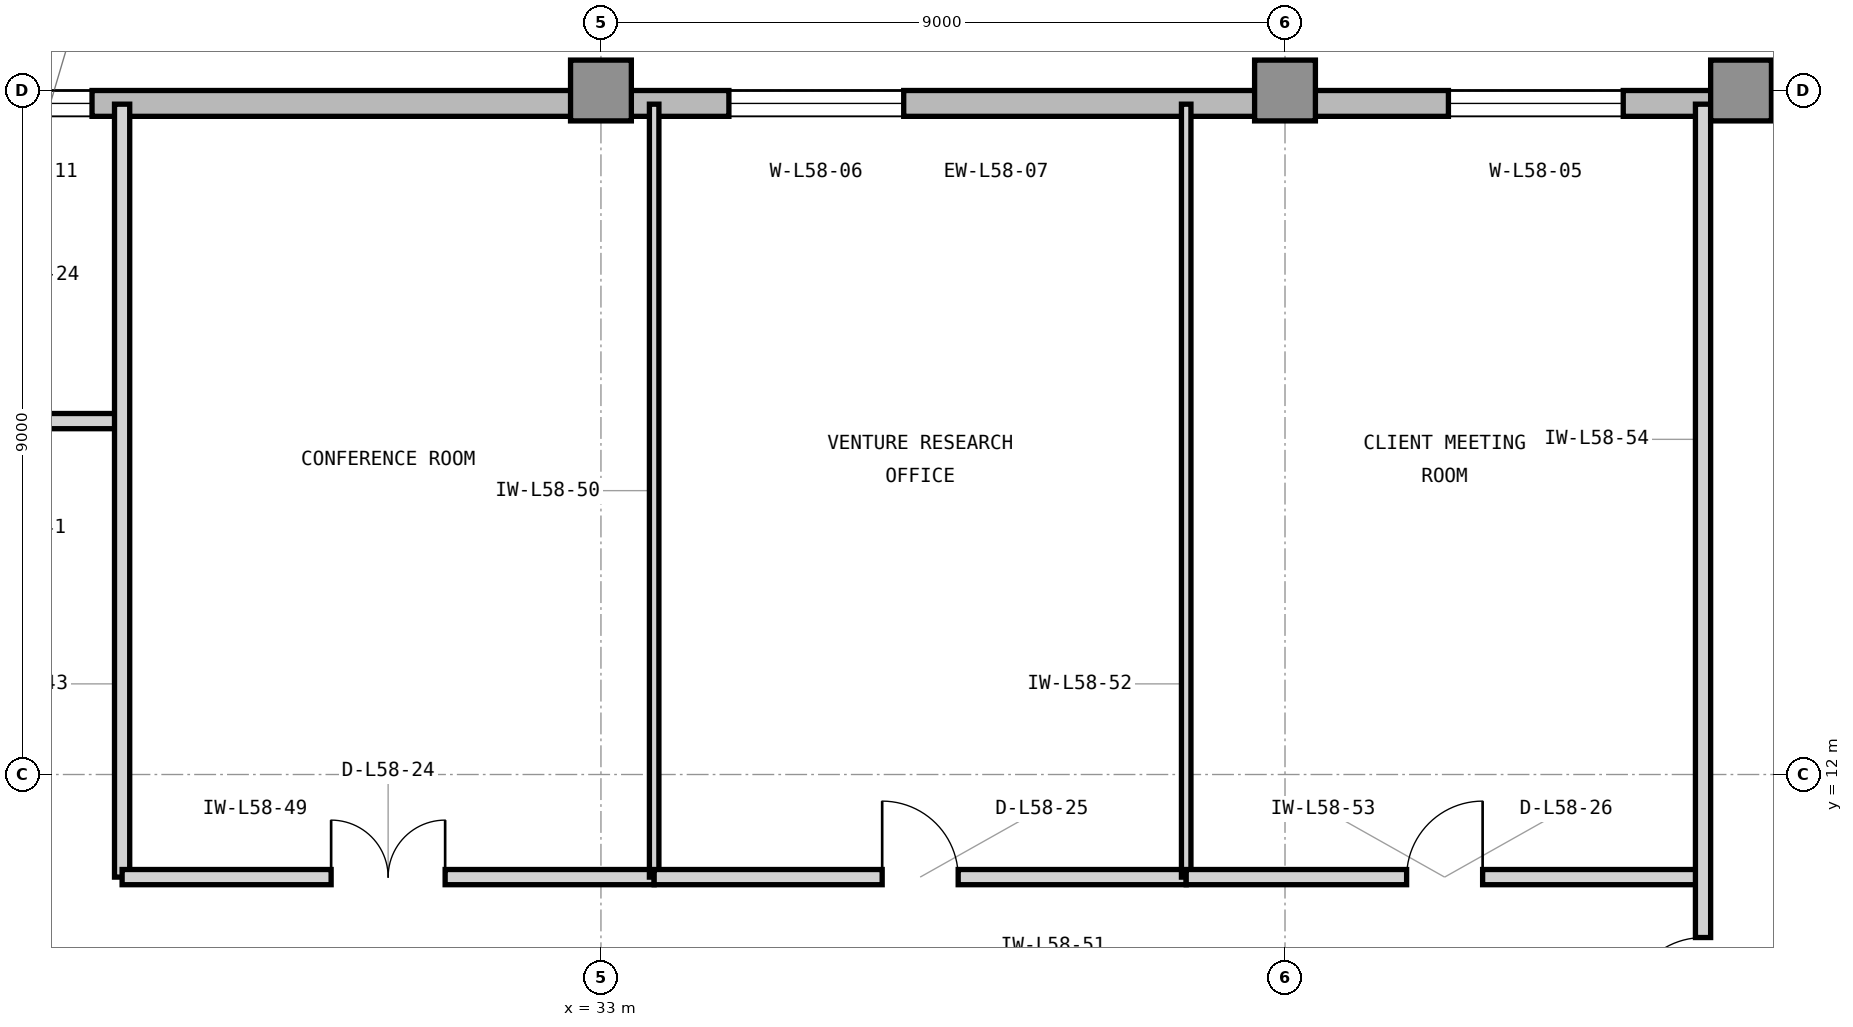
"""IFC4 building model, lengths in metres.
Left out: names, types, materials, properties, quantities, classifications, styles, units other than length and angle.
Written with IfcOpenShell. Run it as: python <this file> out.ifc"""

import sys

from ifc_helpers import new_model, si_unit, direction, frame, frame_2d, origin, origin_2d, place, context, subcontext, project, spatial, rectangle, extrude, element, fill, save


model = new_model("IFC4")
c1 = context("Model", 3, precision=1e-05, world=origin(), true_north=direction((0.0, 1.0)))
c2 = subcontext(c1, "Body", "Model", "MODEL_VIEW")
j1 = project(units=[si_unit("LENGTHUNIT", "METRE"), si_unit("PLANEANGLEUNIT", "RADIAN")], contexts=[c1])
p1 = place(None, origin())
s1 = spatial("IfcSite", under=j1, at=p1, CompositionType="ELEMENT")
p2 = place(p1, origin())
s2 = spatial("IfcBuilding", under=s1, at=p2, CompositionType="ELEMENT")
p3 = place(p2, frame((0.0, 0.0, 239.1)))
s3 = spatial("IfcBuildingStorey", under=s2, at=p3, CompositionType="ELEMENT", Elevation=239.1)
for number, where, z_axis, x_axis in (
    (1, (33.0, 21.0, 0.0), (0.0, 0.0, 1.0), (1.0, 0.0, 0.0)),
    (2, (42.0, 21.0, 0.0), (0.0, 0.0, 1.0), (1.0, 0.0, 0.0)),
    (3, (48.0, 21.0, 0.0), (0.0, 0.0, 1.0), (1.0, 0.0, 0.0)),
):
    element("IfcColumn", number, at=place(p3, frame(where, z_axis=z_axis, x_axis=x_axis)), inside=s3, PredefinedType="COLUMN", context=c2, shape_type="SweptSolid", body=[
        extrude(rectangle(XDim=0.8, YDim=0.8, at=origin_2d()), origin(), (0.0, 0.0, 1.0), 3.9),
    ])
p4 = place(p3, frame((52.4, 20.83, 0.0), z_axis=(0.0, 0.0, 1.0), x_axis=(-1.0, 0.0, 0.0)))
e4 = element("IfcWall", 4, at=p4, inside=s3, PredefinedType="STANDARD", context=c2, shape_type="SweptSolid", body=[
    extrude(rectangle(XDim=28.4, YDim=0.34, at=frame_2d((14.2, 0.0))), origin(), (0.0, 0.0, 1.0), 3.7),
])
p5 = place(p4, frame((5.95, 0.0, 0.9)))
e5 = element("IfcOpeningElement", 5, at=p5, cuts=e4, PredefinedType="OPENING", context=c2, shape_type="SweptSolid", body=[
    extrude(rectangle(XDim=2.3, YDim=2.2, at=frame_2d((1.15, 1.1))), frame((0.0, 0.18, 0.0), z_axis=(0.0, -1.0, 0.0), x_axis=(1.0, 0.0, 0.0)), (0.0, 0.0, 1.0), 0.36),
])
p6 = place(p4, frame((15.417, 0.0, 0.9)))
e6 = element("IfcOpeningElement", 6, at=p6, cuts=e4, PredefinedType="OPENING", context=c2, shape_type="SweptSolid", body=[
    extrude(rectangle(XDim=2.3, YDim=2.2, at=frame_2d((1.15, 1.1))), frame((0.0, 0.18, 0.0), z_axis=(0.0, -1.0, 0.0), x_axis=(1.0, 0.0, 0.0)), (0.0, 0.0, 1.0), 0.36),
])
p7 = place(p4, frame((26.096, 0.0, 0.9)))
e7 = element("IfcOpeningElement", 7, at=p7, cuts=e4, PredefinedType="OPENING", context=c2, shape_type="SweptSolid", body=[
    extrude(rectangle(XDim=1.6, YDim=2.2, at=frame_2d((0.8, 1.1))), frame((0.0, 0.18, 0.0), z_axis=(0.0, -1.0, 0.0), x_axis=(1.0, 0.0, 0.0)), (0.0, 0.0, 1.0), 0.36),
])
p8 = place(p3, frame((23.85, 16.65, 0.0), z_axis=(0.0, 0.0, 1.0), x_axis=(1.0, 0.0, 0.0)))
e8 = element("IfcWall", 8, at=p8, inside=s3, PredefinedType="PARTITIONING", context=c2, shape_type="SweptSolid", body=[
    extrude(rectangle(XDim=2.85, YDim=0.2, at=frame_2d((1.425, 0.0))), origin(), (0.0, 0.0, 1.0), 3.69),
])
p9 = place(p8, frame((0.7, 0.0, 0.0)))
e9 = element("IfcOpeningElement", 9, at=p9, cuts=e8, PredefinedType="OPENING", context=c2, shape_type="SweptSolid", body=[
    extrude(rectangle(XDim=1.0, YDim=2.15, at=frame_2d((0.5, 1.075))), frame((0.0, 0.11, 0.0), z_axis=(0.0, -1.0, 0.0), x_axis=(1.0, 0.0, 0.0)), (0.0, 0.0, 1.0), 0.22),
])
p10 = place(p3, frame((26.7, 10.65, 0.0), z_axis=(0.0, 0.0, 1.0), x_axis=(0.0, 1.0, 0.0)))
e10 = element("IfcWall", 10, at=p10, inside=s3, PredefinedType="PARTITIONING", context=c2, shape_type="SweptSolid", body=[
    extrude(rectangle(XDim=10.17, YDim=0.2, at=frame_2d((5.085, 0.0))), origin(), (0.0, 0.0, 1.0), 3.69),
])
p11 = place(p3, frame((26.7, 10.65, 0.0), z_axis=(0.0, 0.0, 1.0), x_axis=(1.0, 0.0, 0.0)))
e11 = element("IfcWall", 11, at=p11, inside=s3, PredefinedType="PARTITIONING", context=c2, shape_type="SweptSolid", body=[
    extrude(rectangle(XDim=7.0, YDim=0.2, at=frame_2d((3.5, 0.0))), origin(), (0.0, 0.0, 1.0), 3.69),
])
p12 = place(p11, frame((2.75, 0.0, 0.0)))
e12 = element("IfcOpeningElement", 12, at=p12, cuts=e11, PredefinedType="OPENING", context=c2, shape_type="SweptSolid", body=[
    extrude(rectangle(XDim=1.5, YDim=2.3, at=frame_2d((0.75, 1.15))), frame((0.0, 0.11, 0.0), z_axis=(0.0, -1.0, 0.0), x_axis=(1.0, 0.0, 0.0)), (0.0, 0.0, 1.0), 0.22),
])
p13 = place(p3, frame((33.7, 10.65, 0.0), z_axis=(0.0, 0.0, 1.0), x_axis=(0.0, 1.0, 0.0)))
e13 = element("IfcWall", 13, at=p13, inside=s3, PredefinedType="PARTITIONING", context=c2, shape_type="SweptSolid", body=[
    extrude(rectangle(XDim=10.17, YDim=0.125, at=frame_2d((5.085, 0.0))), origin(), (0.0, 0.0, 1.0), 3.69),
])
p14 = place(p3, frame((33.7, 10.65, 0.0), z_axis=(0.0, 0.0, 1.0), x_axis=(1.0, 0.0, 0.0)))
e14 = element("IfcWall", 14, at=p14, inside=s3, PredefinedType="PARTITIONING", context=c2, shape_type="SweptSolid", body=[
    extrude(rectangle(XDim=7.0, YDim=0.2, at=frame_2d((3.5, 0.0))), origin(), (0.0, 0.0, 1.0), 3.69),
])
p15 = place(p14, frame((3.0, 0.0, 0.0)))
e15 = element("IfcOpeningElement", 15, at=p15, cuts=e14, PredefinedType="OPENING", context=c2, shape_type="SweptSolid", body=[
    extrude(rectangle(XDim=1.0, YDim=2.15, at=frame_2d((0.5, 1.075))), frame((0.0, 0.11, 0.0), z_axis=(0.0, -1.0, 0.0), x_axis=(1.0, 0.0, 0.0)), (0.0, 0.0, 1.0), 0.22),
])
p16 = place(p3, frame((40.7, 10.65, 0.0), z_axis=(0.0, 0.0, 1.0), x_axis=(0.0, 1.0, 0.0)))
e16 = element("IfcWall", 16, at=p16, inside=s3, PredefinedType="PARTITIONING", context=c2, shape_type="SweptSolid", body=[
    extrude(rectangle(XDim=10.17, YDim=0.125, at=frame_2d((5.085, 0.0))), origin(), (0.0, 0.0, 1.0), 3.69),
])
p17 = place(p3, frame((40.7, 10.65, 0.0), z_axis=(0.0, 0.0, 1.0), x_axis=(1.0, 0.0, 0.0)))
e17 = element("IfcWall", 17, at=p17, inside=s3, PredefinedType="PARTITIONING", context=c2, shape_type="SweptSolid", body=[
    extrude(rectangle(XDim=6.8, YDim=0.2, at=frame_2d((3.4, 0.0))), origin(), (0.0, 0.0, 1.0), 3.69),
])
p18 = place(p17, frame((2.9, 0.0, 0.0)))
e18 = element("IfcOpeningElement", 18, at=p18, cuts=e17, PredefinedType="OPENING", context=c2, shape_type="SweptSolid", body=[
    extrude(rectangle(XDim=1.0, YDim=2.15, at=frame_2d((0.5, 1.075))), frame((0.0, 0.11, 0.0), z_axis=(0.0, -1.0, 0.0), x_axis=(1.0, 0.0, 0.0)), (0.0, 0.0, 1.0), 0.22),
])
p19 = place(p3, frame((47.5, 3.18, 0.0), z_axis=(0.0, 0.0, 1.0), x_axis=(0.0, 1.0, 0.0)))
e19 = element("IfcWall", 19, at=p19, inside=s3, PredefinedType="PARTITIONING", context=c2, shape_type="SweptSolid", body=[
    extrude(rectangle(XDim=17.64, YDim=0.2, at=frame_2d((8.82, 0.0))), origin(), (0.0, 0.0, 1.0), 3.69),
])
p20 = place(p19, frame((5.675, 0.0, 0.0)))
e20 = element("IfcOpeningElement", 20, at=p20, cuts=e19, PredefinedType="OPENING", context=c2, shape_type="SweptSolid", body=[
    extrude(rectangle(XDim=1.0, YDim=2.15, at=frame_2d((0.5, 1.075))), frame((0.0, 0.11, 0.0), z_axis=(0.0, -1.0, 0.0), x_axis=(1.0, 0.0, 0.0)), (0.0, 0.0, 1.0), 0.22),
])
p21 = place(p5, origin())
e21 = element("IfcWindow", 21, at=p21, inside=s3, PartitioningType="SINGLE_PANEL", PredefinedType="WINDOW", context=c2, shape_type="SweptSolid", body=[
    extrude(rectangle(XDim=2.3, YDim=2.2, at=frame_2d((1.15, 1.1))), frame((0.0, 0.11, 0.0), z_axis=(0.0, -1.0, 0.0), x_axis=(1.0, 0.0, 0.0)), (0.0, 0.0, 1.0), 0.06),
])
fill(e5, e21)
p22 = place(p6, origin())
e22 = element("IfcWindow", 22, at=p22, inside=s3, PartitioningType="SINGLE_PANEL", PredefinedType="WINDOW", context=c2, shape_type="SweptSolid", body=[
    extrude(rectangle(XDim=2.3, YDim=2.2, at=frame_2d((1.15, 1.1))), frame((0.0, 0.11, 0.0), z_axis=(0.0, -1.0, 0.0), x_axis=(1.0, 0.0, 0.0)), (0.0, 0.0, 1.0), 0.06),
])
fill(e6, e22)
p23 = place(p12, origin())
e23 = element("IfcDoor", 23, at=p23, inside=s3, OperationType="DOUBLE_DOOR_SINGLE_SWING", PredefinedType="DOOR", context=c2, shape_type="SweptSolid", body=[
    extrude(rectangle(XDim=1.5, YDim=2.3, at=frame_2d((0.75, 1.15))), frame((0.0, 0.025, 0.0), z_axis=(0.0, -1.0, 0.0), x_axis=(1.0, 0.0, 0.0)), (0.0, 0.0, 1.0), 0.05),
])
fill(e12, e23)
p24 = place(p15, origin())
e24 = element("IfcDoor", 24, at=p24, inside=s3, OperationType="SINGLE_SWING_LEFT", PredefinedType="DOOR", context=c2, shape_type="SweptSolid", body=[
    extrude(rectangle(XDim=1.0, YDim=2.15, at=frame_2d((0.5, 1.075))), frame((0.0, 0.025, 0.0), z_axis=(0.0, -1.0, 0.0), x_axis=(1.0, 0.0, 0.0)), (0.0, 0.0, 1.0), 0.05),
])
fill(e15, e24)
p25 = place(p18, origin())
e25 = element("IfcDoor", 25, at=p25, inside=s3, OperationType="SINGLE_SWING_RIGHT", PredefinedType="DOOR", context=c2, shape_type="SweptSolid", body=[
    extrude(rectangle(XDim=1.0, YDim=2.15, at=frame_2d((0.5, 1.075))), frame((0.0, 0.025, 0.0), z_axis=(0.0, -1.0, 0.0), x_axis=(1.0, 0.0, 0.0)), (0.0, 0.0, 1.0), 0.05),
])
fill(e18, e25)
p26 = place(p20, origin())
e26 = element("IfcDoor", 26, at=p26, inside=s3, OperationType="SINGLE_SWING_LEFT", PredefinedType="DOOR", context=c2, shape_type="SweptSolid", body=[
    extrude(rectangle(XDim=1.0, YDim=2.15, at=frame_2d((0.5, 1.075))), frame((0.0, 0.025, 0.0), z_axis=(0.0, -1.0, 0.0), x_axis=(1.0, 0.0, 0.0)), (0.0, 0.0, 1.0), 0.05),
])
fill(e20, e26)
p27 = place(p7, origin())
e27 = element("IfcWindow", 27, at=p27, inside=s3, PartitioningType="SINGLE_PANEL", PredefinedType="WINDOW", context=c2, shape_type="SweptSolid", body=[
    extrude(rectangle(XDim=1.6, YDim=2.2, at=frame_2d((0.8, 1.1))), frame((0.0, 0.11, 0.0), z_axis=(0.0, -1.0, 0.0), x_axis=(1.0, 0.0, 0.0)), (0.0, 0.0, 1.0), 0.06),
])
fill(e7, e27)
save(model, sys.argv[1])
